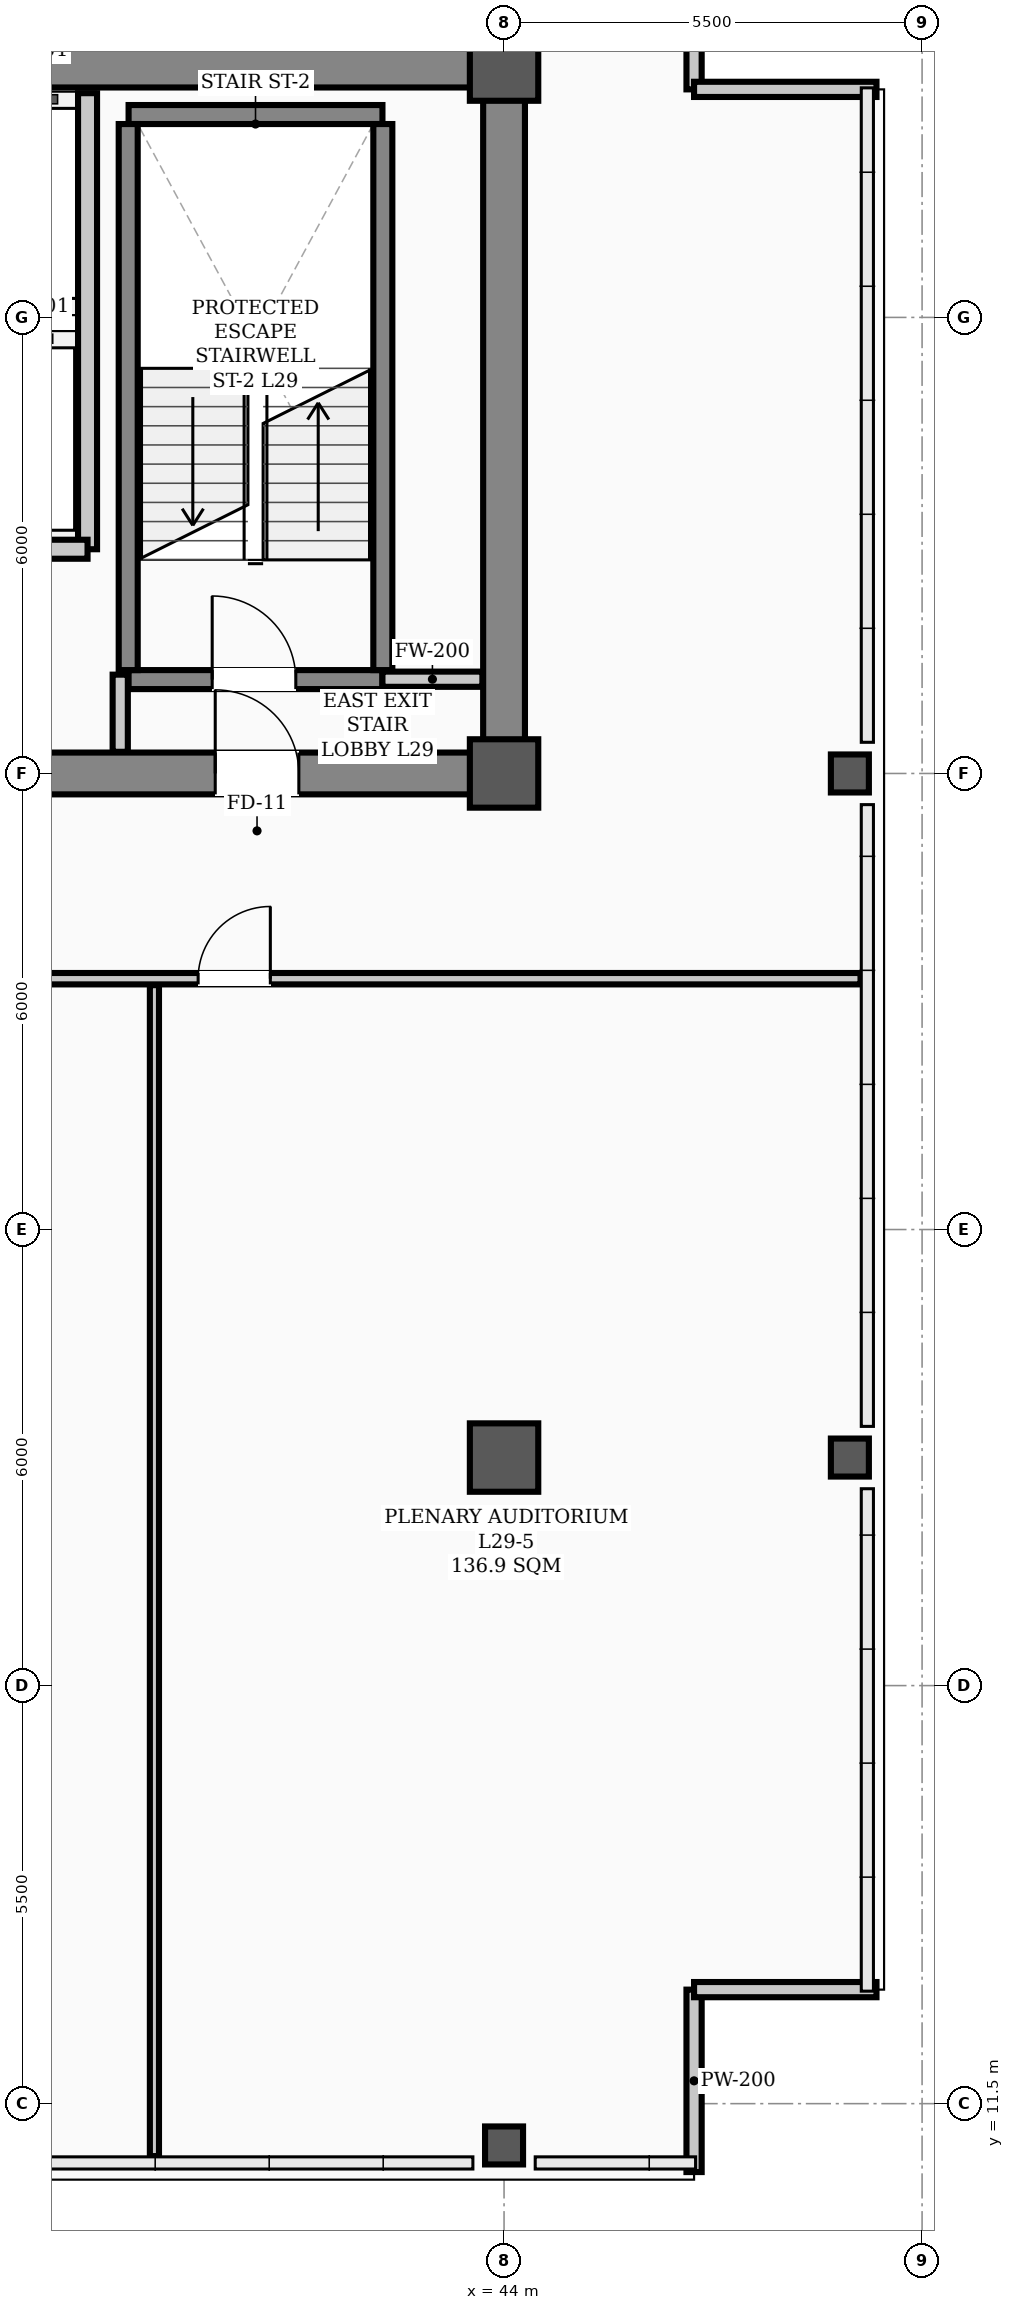
"""IFC4 building model, lengths in metres.
Left out: names, types, materials, properties, quantities, classifications, styles, units other than length and angle.
Written with IfcOpenShell. Run it as: python <this file> out.ifc"""

import sys

from ifc_helpers import new_model, si_unit, direction, frame, frame_2d, origin, origin_2d, place, context, subcontext, project, spatial, rectangle, hollow_rectangle, extrude, element, fill, save


model = new_model("IFC4")
c1 = context("Model", 3, precision=1e-05, world=origin(), true_north=direction((0.0, 1.0)))
c2 = subcontext(c1, "Body", "Model", "MODEL_VIEW")
j1 = project(units=[si_unit("LENGTHUNIT", "METRE"), si_unit("PLANEANGLEUNIT", "RADIAN")], contexts=[c1])
p1 = place(None, origin())
s1 = spatial("IfcSite", under=j1, at=p1, CompositionType="ELEMENT")
p2 = place(p1, origin())
s2 = spatial("IfcBuilding", under=s1, at=p2, CompositionType="ELEMENT")
p3 = place(p2, frame((0.0, 0.0, 118.8)))
s3 = spatial("IfcBuildingStorey", under=s2, at=p3, CompositionType="ELEMENT", Elevation=118.8)
for number, where, z_axis, x_axis in (
    (1, (44.0, 29.0, 0.0), (0.0, 0.0, 1.0), (1.0, 0.0, 0.0)),
    (2, (44.0, 38.3, 0.0), (0.0, 0.0, 1.0), (1.0, 0.0, 0.0)),
    (3, (44.0, 20.0, 0.0), (0.0, 0.0, 1.0), (1.0, 0.0, 0.0)),
):
    element("IfcColumn", number, at=place(p3, frame(where, z_axis=z_axis, x_axis=x_axis)), inside=s3, PredefinedType="COLUMN", context=c2, shape_type="SweptSolid", body=[
        extrude(hollow_rectangle(XDim=0.9, YDim=0.9, WallThickness=0.035, InnerFilletRadius=0.017, OuterFilletRadius=0.052, at=origin_2d()), origin(), (0.0, 0.0, 1.0), 3.9),
    ])
for number, where, z_axis, x_axis in (
    (4, (44.0, 10.95, 0.0), (0.0, 0.0, 1.0), (1.0, 0.0, 0.0)),
    (5, (48.55, 20.0, 0.0), (0.0, 0.0, 1.0), (1.0, 0.0, 0.0)),
    (6, (48.55, 29.0, 0.0), (0.0, 0.0, 1.0), (1.0, 0.0, 0.0)),
):
    element("IfcColumn", number, at=place(p3, frame(where, z_axis=z_axis, x_axis=x_axis)), inside=s3, PredefinedType="COLUMN", context=c2, shape_type="SweptSolid", body=[
        extrude(hollow_rectangle(XDim=0.5, YDim=0.5, WallThickness=0.024, InnerFilletRadius=0.012, OuterFilletRadius=0.036, at=origin_2d()), origin(), (0.0, 0.0, 1.0), 3.9),
    ])
for number, where, z_axis, x_axis in (
    (7, (46.5, 10.6, 0.0), (0.0, 0.0, 1.0), (0.0, 1.0, 0.0)),
    (8, (46.5, 13.0, 0.0), (0.0, 0.0, 1.0), (1.0, 0.0, 0.0)),
    (9, (46.5, 40.4, 0.0), (0.0, 0.0, 1.0), (0.0, -1.0, 0.0)),
    (10, (46.5, 38.0, 0.0), (0.0, 0.0, 1.0), (1.0, 0.0, 0.0)),
):
    element("IfcWall", number, at=place(p3, frame(where, z_axis=z_axis, x_axis=x_axis)), inside=s3, PredefinedType="PARAPET", context=c2, shape_type="SweptSolid", body=[
        extrude(rectangle(XDim=2.4, YDim=0.2, at=frame_2d((1.2, 0.0))), origin(), (0.0, 0.0, 1.0), 1.2),
    ])
p4 = place(p3, frame((13.5, 29.0, 0.0), z_axis=(0.0, 0.0, 1.0), x_axis=(1.0, 0.0, 0.0)))
e11 = element("IfcWall", 11, at=p4, inside=s3, PredefinedType="SHEAR", context=c2, shape_type="SweptSolid", body=[
    extrude(rectangle(XDim=30.5, YDim=0.55, at=frame_2d((15.25, 0.0))), origin(), (0.0, 0.0, 1.0), 3.72),
])
p5 = place(p4, frame((1.75, 0.0, 0.0)))
e12 = element("IfcOpeningElement", 12, at=p5, cuts=e11, PredefinedType="OPENING", context=c2, shape_type="SweptSolid", body=[
    extrude(rectangle(XDim=1.1, YDim=2.08, at=frame_2d((0.55, 1.04))), frame((0.0, 0.285, 0.0), z_axis=(0.0, -1.0, 0.0), x_axis=(1.0, 0.0, 0.0)), (0.0, 0.0, 1.0), 0.57),
])
p6 = place(p4, frame((26.7, 0.0, 0.0)))
e13 = element("IfcOpeningElement", 13, at=p6, cuts=e11, PredefinedType="OPENING", context=c2, shape_type="SweptSolid", body=[
    extrude(rectangle(XDim=1.1, YDim=2.08, at=frame_2d((0.55, 1.04))), frame((0.0, 0.285, 0.0), z_axis=(0.0, -1.0, 0.0), x_axis=(1.0, 0.0, 0.0)), (0.0, 0.0, 1.0), 0.57),
])
p7 = place(p4, frame((6.8, 0.0, 0.0)))
e14 = element("IfcOpeningElement", 14, at=p7, cuts=e11, PredefinedType="OPENING", context=c2, shape_type="SweptSolid", body=[
    extrude(rectangle(XDim=1.1, YDim=2.08, at=frame_2d((0.55, 1.04))), frame((0.0, 0.285, 0.0), z_axis=(0.0, -1.0, 0.0), x_axis=(1.0, 0.0, 0.0)), (0.0, 0.0, 1.0), 0.57),
])
p8 = place(p4, frame((13.2, 0.0, 0.0)))
e15 = element("IfcOpeningElement", 15, at=p8, cuts=e11, PredefinedType="OPENING", context=c2, shape_type="SweptSolid", body=[
    extrude(rectangle(XDim=1.6, YDim=2.08, at=frame_2d((0.8, 1.04))), frame((0.0, 0.285, 0.0), z_axis=(0.0, -1.0, 0.0), x_axis=(1.0, 0.0, 0.0)), (0.0, 0.0, 1.0), 0.57),
])
p9 = place(p4, frame((19.5, 0.0, 0.0)))
e16 = element("IfcOpeningElement", 16, at=p9, cuts=e11, PredefinedType="OPENING", context=c2, shape_type="SweptSolid", body=[
    extrude(rectangle(XDim=0.9, YDim=2.08, at=frame_2d((0.45, 1.04))), frame((0.0, 0.285, 0.0), z_axis=(0.0, -1.0, 0.0), x_axis=(1.0, 0.0, 0.0)), (0.0, 0.0, 1.0), 0.57),
])
p10 = place(p4, frame((21.55, 0.0, 0.0)))
e17 = element("IfcOpeningElement", 17, at=p10, cuts=e11, PredefinedType="OPENING", context=c2, shape_type="SweptSolid", body=[
    extrude(rectangle(XDim=0.9, YDim=2.08, at=frame_2d((0.45, 1.04))), frame((0.0, 0.285, 0.0), z_axis=(0.0, -1.0, 0.0), x_axis=(1.0, 0.0, 0.0)), (0.0, 0.0, 1.0), 0.57),
])
p11 = place(p3, frame((13.5, 38.3, 0.0), z_axis=(0.0, 0.0, 1.0), x_axis=(1.0, 0.0, 0.0)))
e18 = element("IfcWall", 18, at=p11, inside=s3, PredefinedType="SHEAR", context=c2, shape_type="SweptSolid", body=[
    extrude(rectangle(XDim=30.5, YDim=0.55, at=frame_2d((15.25, 0.0))), origin(), (0.0, 0.0, 1.0), 3.72),
])
p12 = place(p3, frame((44.0, 29.35, 0.0), z_axis=(0.0, 0.0, 1.0), x_axis=(0.0, 1.0, 0.0)))
e19 = element("IfcWall", 19, at=p12, inside=s3, PredefinedType="SHEAR", context=c2, shape_type="SweptSolid", body=[
    extrude(rectangle(XDim=8.6, YDim=0.55, at=frame_2d((4.3, 0.0))), origin(), (0.0, 0.0, 1.0), 3.72),
])
p13 = place(p3, frame((39.06, 30.235, 0.0), z_axis=(0.0, 0.0, 1.0), x_axis=(1.0, 0.0, 0.0)))
e20 = element("IfcWall", 20, at=p13, inside=s3, PredefinedType="STANDARD", context=c2, shape_type="SweptSolid", body=[
    extrude(rectangle(XDim=3.34, YDim=0.25, at=frame_2d((1.67, 0.0))), origin(), (0.0, 0.0, 1.0), 3.72),
])
p14 = place(p13, frame((1.1, 0.0, 0.0)))
e21 = element("IfcOpeningElement", 21, at=p14, cuts=e20, PredefinedType="OPENING", context=c2, shape_type="SweptSolid", body=[
    extrude(rectangle(XDim=1.1, YDim=2.08, at=frame_2d((0.55, 1.04))), frame((0.0, 0.135, 0.0), z_axis=(0.0, -1.0, 0.0), x_axis=(1.0, 0.0, 0.0)), (0.0, 0.0, 1.0), 0.27),
])
p15 = place(p3, frame((39.06, 37.669, 0.0), z_axis=(0.0, 0.0, 1.0), x_axis=(1.0, 0.0, 0.0)))
e22 = element("IfcWall", 22, at=p15, inside=s3, PredefinedType="STANDARD", context=c2, shape_type="SweptSolid", body=[
    extrude(rectangle(XDim=3.34, YDim=0.25, at=frame_2d((1.67, 0.0))), origin(), (0.0, 0.0, 1.0), 3.72),
])
for number, where, z_axis, x_axis in (
    (23, (39.055, 30.36, 0.0), (0.0, 0.0, 1.0), (0.0, 1.0, 0.0)),
    (24, (42.405, 30.36, 0.0), (0.0, 0.0, 1.0), (0.0, 1.0, 0.0)),
):
    element("IfcWall", number, at=place(p3, frame(where, z_axis=z_axis, x_axis=x_axis)), inside=s3, PredefinedType="STANDARD", context=c2, shape_type="SweptSolid", body=[
        extrude(rectangle(XDim=7.184, YDim=0.25, at=frame_2d((3.592, 0.0))), origin(), (0.0, 0.0, 1.0), 3.72),
    ])
p16 = place(p3, frame((38.52, 31.95, 0.0), z_axis=(0.0, 0.0, 1.0), x_axis=(0.0, 1.0, 0.0)))
e25 = element("IfcWall", 25, at=p16, inside=s3, PredefinedType="STANDARD", context=c2, shape_type="SweptSolid", body=[
    extrude(rectangle(XDim=6.0, YDim=0.25, at=frame_2d((3.0, 0.0))), origin(), (0.0, 0.0, 1.0), 3.48),
])
p17 = place(p3, frame((36.62, 31.95, 0.0), z_axis=(0.0, 0.0, 1.0), x_axis=(1.0, 0.0, 0.0)))
e26 = element("IfcWall", 26, at=p17, inside=s3, PredefinedType="STANDARD", context=c2, shape_type="SweptSolid", body=[
    extrude(rectangle(XDim=1.9, YDim=0.25, at=frame_2d((0.95, 0.0))), origin(), (0.0, 0.0, 1.0), 3.48),
])
p18 = place(p3, frame((42.4, 30.24, 0.0), z_axis=(0.0, 0.0, 1.0), x_axis=(1.0, 0.0, 0.0)))
e27 = element("IfcWall", 27, at=p18, inside=s3, PredefinedType="STANDARD", context=c2, shape_type="SweptSolid", body=[
    extrude(rectangle(XDim=1.315, YDim=0.2, at=frame_2d((0.658, 0.0))), origin(), (0.0, 0.0, 1.0), 3.1),
])
p19 = place(p3, frame((2.31, 26.3, 0.0), z_axis=(0.0, 0.0, 1.0), x_axis=(1.0, 0.0, 0.0)))
e28 = element("IfcWall", 28, at=p19, inside=s3, PredefinedType="PARTITIONING", context=c2, shape_type="SweptSolid", body=[
    extrude(rectangle(XDim=46.38, YDim=0.15, at=frame_2d((23.19, 0.0))), origin(), (0.0, 0.0, 1.0), 3.1),
])
p20 = place(p19, frame((10.19, 0.0, 0.0)))
e29 = element("IfcOpeningElement", 29, at=p20, cuts=e28, PredefinedType="OPENING", context=c2, shape_type="SweptSolid", body=[
    extrude(rectangle(XDim=0.95, YDim=2.08, at=frame_2d((0.475, 1.04))), frame((0.0, 0.085, 0.0), z_axis=(0.0, -1.0, 0.0), x_axis=(1.0, 0.0, 0.0)), (0.0, 0.0, 1.0), 0.17),
])
p21 = place(p19, frame((15.915, 0.0, 0.0)))
e30 = element("IfcOpeningElement", 30, at=p21, cuts=e28, PredefinedType="OPENING", context=c2, shape_type="SweptSolid", body=[
    extrude(rectangle(XDim=0.95, YDim=2.08, at=frame_2d((0.475, 1.04))), frame((0.0, 0.085, 0.0), z_axis=(0.0, -1.0, 0.0), x_axis=(1.0, 0.0, 0.0)), (0.0, 0.0, 1.0), 0.17),
])
p22 = place(p19, frame((24.115, 0.0, 0.0)))
e31 = element("IfcOpeningElement", 31, at=p22, cuts=e28, PredefinedType="OPENING", context=c2, shape_type="SweptSolid", body=[
    extrude(rectangle(XDim=0.95, YDim=2.08, at=frame_2d((0.475, 1.04))), frame((0.0, 0.085, 0.0), z_axis=(0.0, -1.0, 0.0), x_axis=(1.0, 0.0, 0.0)), (0.0, 0.0, 1.0), 0.17),
])
p23 = place(p19, frame((32.515, 0.0, 0.0)))
e32 = element("IfcOpeningElement", 32, at=p23, cuts=e28, PredefinedType="OPENING", context=c2, shape_type="SweptSolid", body=[
    extrude(rectangle(XDim=0.95, YDim=2.08, at=frame_2d((0.475, 1.04))), frame((0.0, 0.085, 0.0), z_axis=(0.0, -1.0, 0.0), x_axis=(1.0, 0.0, 0.0)), (0.0, 0.0, 1.0), 0.17),
])
p24 = place(p19, frame((37.665, 0.0, 0.0)))
e33 = element("IfcOpeningElement", 33, at=p24, cuts=e28, PredefinedType="OPENING", context=c2, shape_type="SweptSolid", body=[
    extrude(rectangle(XDim=0.95, YDim=2.08, at=frame_2d((0.475, 1.04))), frame((0.0, 0.085, 0.0), z_axis=(0.0, -1.0, 0.0), x_axis=(1.0, 0.0, 0.0)), (0.0, 0.0, 1.0), 0.17),
])
p25 = place(p3, frame((38.95, 29.285, 0.0), z_axis=(0.0, 0.0, 1.0), x_axis=(0.0, 1.0, 0.0)))
e34 = element("IfcWall", 34, at=p25, inside=s3, PredefinedType="STANDARD", context=c2, shape_type="SweptSolid", body=[
    extrude(rectangle(XDim=1.015, YDim=0.2, at=frame_2d((0.508, 0.0))), origin(), (0.0, 0.0, 1.0), 3.3),
])
p26 = place(p3, frame((39.4, 10.81, 0.0), z_axis=(0.0, 0.0, 1.0), x_axis=(0.0, 1.0, 0.0)))
e35 = element("IfcWall", 35, at=p26, inside=s3, PredefinedType="PARTITIONING", context=c2, shape_type="SweptSolid", body=[
    extrude(rectangle(XDim=15.405, YDim=0.12, at=frame_2d((7.703, 0.0))), origin(), (0.0, 0.0, 1.0), 3.0),
])
p27 = place(p14, origin())
e36 = element("IfcDoor", 36, at=p27, inside=s3, OperationType="SINGLE_SWING_LEFT", PredefinedType="DOOR", context=c2, shape_type="SweptSolid", body=[
    extrude(rectangle(XDim=1.1, YDim=2.08, at=frame_2d((0.55, 1.04))), frame((0.0, 0.025, 0.0), z_axis=(0.0, -1.0, 0.0), x_axis=(1.0, 0.0, 0.0)), (0.0, 0.0, 1.0), 0.05),
])
fill(e21, e36)
p28 = place(p6, origin())
e37 = element("IfcDoor", 37, at=p28, inside=s3, OperationType="SINGLE_SWING_LEFT", PredefinedType="DOOR", context=c2, shape_type="SweptSolid", body=[
    extrude(rectangle(XDim=1.1, YDim=2.08, at=frame_2d((0.55, 1.04))), frame((0.0, 0.025, 0.0), z_axis=(0.0, -1.0, 0.0), x_axis=(1.0, 0.0, 0.0)), (0.0, 0.0, 1.0), 0.05),
])
fill(e13, e37)
p29 = place(p24, origin())
e38 = element("IfcDoor", 38, at=p29, inside=s3, OperationType="SINGLE_SWING_RIGHT", PredefinedType="DOOR", context=c2, shape_type="SweptSolid", body=[
    extrude(rectangle(XDim=0.95, YDim=2.08, at=frame_2d((0.475, 1.04))), frame((0.0, 0.025, 0.0), z_axis=(0.0, -1.0, 0.0), x_axis=(1.0, 0.0, 0.0)), (0.0, 0.0, 1.0), 0.05),
])
fill(e33, e38)
save(model, sys.argv[1])
